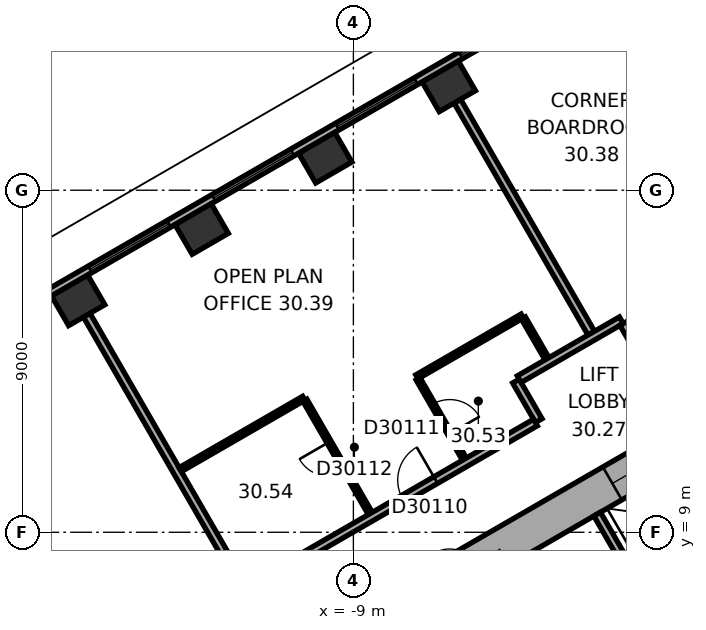
"""IFC4 building model, lengths in metres.
Left out: names, types, materials, properties, quantities, classifications, styles, units other than length and angle.
Written with IfcOpenShell. Run it as: python <this file> out.ifc"""

import sys

from ifc_helpers import new_model, si_unit, direction, frame, frame_2d, origin, origin_2d, place, context, subcontext, project, spatial, rectangle, extrude, element, fill, save


model = new_model("IFC4")
c1 = context("Model", 3, precision=1e-05, world=origin(), true_north=direction((0.0, 1.0)))
c2 = subcontext(c1, "Body", "Model", "MODEL_VIEW")
j1 = project(units=[si_unit("LENGTHUNIT", "METRE"), si_unit("PLANEANGLEUNIT", "RADIAN")], contexts=[c1])
p1 = place(None, origin())
s1 = spatial("IfcSite", under=j1, at=p1, CompositionType="ELEMENT")
p2 = place(p1, origin())
s2 = spatial("IfcBuilding", under=s1, at=p2, CompositionType="ELEMENT")
p3 = place(p2, frame((0.0, 0.0, 124.4)))
s3 = spatial("IfcBuildingStorey", under=s2, at=p3, CompositionType="ELEMENT", Elevation=124.4)
for number, where, z_axis, x_axis in (
    (1, (-6.489, 20.733, 0.0), (0.0, 0.0, 1.0), (-0.866, -0.5, 0.0)),
    (2, (-9.74, 18.856, 0.0), (0.0, 0.0, 1.0), (-0.866, -0.5, 0.0)),
    (3, (-12.991, 16.979, 0.0), (0.0, 0.0, 1.0), (-0.866, -0.5, 0.0)),
    (4, (-16.242, 15.102, 0.0), (0.0, 0.0, 1.0), (-0.866, -0.5, 0.0)),
):
    element("IfcColumn", number, at=place(p3, frame(where, z_axis=z_axis, x_axis=x_axis)), inside=s3, PredefinedType="COLUMN", context=c2, shape_type="SweptSolid", body=[
        extrude(rectangle(XDim=1.1, YDim=0.9, at=origin_2d()), origin(), (0.0, 0.0, 1.0), 3.7),
    ])
p4 = place(p3, frame((0.25, 11.691, 0.0), z_axis=(0.0, 0.0, 1.0), x_axis=(-0.866022616891, -0.50000482701, 0.0)))
e5 = element("IfcWall", 5, at=p4, inside=s3, PredefinedType="SHEAR", context=c2, shape_type="SweptSolid", body=[
    extrude(rectangle(XDim=12.125, YDim=1.0, at=frame_2d((6.062, 0.0))), origin(), (0.0, 0.0, 1.0), 3.7),
])
p5 = place(p4, frame((6.262, 0.0, 0.0)))
e6 = element("IfcOpeningElement", 6, at=p5, cuts=e5, PredefinedType="OPENING", context=c2, shape_type="SweptSolid", body=[
    extrude(rectangle(XDim=1.5, YDim=2.1, at=frame_2d((0.75, 1.05))), frame((0.0, 0.51, 0.0), z_axis=(0.0, -1.0, 0.0), x_axis=(1.0, 0.0, 0.0)), (0.0, 0.0, 1.0), 1.02),
])
p6 = place(p4, frame((1.712, 0.0, 0.0)))
e7 = element("IfcOpeningElement", 7, at=p6, cuts=e5, PredefinedType="OPENING", context=c2, shape_type="SweptSolid", body=[
    extrude(rectangle(XDim=1.1, YDim=2.1, at=frame_2d((0.55, 1.05))), frame((0.0, 0.51, 0.0), z_axis=(0.0, -1.0, 0.0), x_axis=(1.0, 0.0, 0.0)), (0.0, 0.0, 1.0), 1.02),
])
p7 = place(p3, frame((-2.961, 23.405, 0.0), z_axis=(0.0, 0.0, 1.0), x_axis=(-0.866023315909, -0.500003616288, 0.0)))
e8 = element("IfcWall", 8, at=p7, inside=s3, PredefinedType="STANDARD", context=c2, shape_type="SweptSolid", body=[
    extrude(rectangle(XDim=20.044, YDim=0.2, at=frame_2d((10.022, 0.0))), origin(), (0.0, 0.0, 1.0), 3.7),
])
p8 = place(p7, frame((1.314, 0.0, 0.9)))
e9 = element("IfcOpeningElement", 9, at=p8, cuts=e8, PredefinedType="OPENING", context=c2, shape_type="SweptSolid", body=[
    extrude(rectangle(XDim=2.4, YDim=2.0, at=frame_2d((1.2, 1.0))), frame((0.0, 0.11, 0.0), z_axis=(0.0, -1.0, 0.0), x_axis=(1.0, 0.0, 0.0)), (0.0, 0.0, 1.0), 0.22),
])
p9 = place(p7, frame((5.069, 0.0, 0.9)))
e10 = element("IfcOpeningElement", 10, at=p9, cuts=e8, PredefinedType="OPENING", context=c2, shape_type="SweptSolid", body=[
    extrude(rectangle(XDim=2.4, YDim=2.0, at=frame_2d((1.2, 1.0))), frame((0.0, 0.11, 0.0), z_axis=(0.0, -1.0, 0.0), x_axis=(1.0, 0.0, 0.0)), (0.0, 0.0, 1.0), 0.22),
])
p10 = place(p7, frame((8.823, 0.0, 0.9)))
e11 = element("IfcOpeningElement", 11, at=p10, cuts=e8, PredefinedType="OPENING", context=c2, shape_type="SweptSolid", body=[
    extrude(rectangle(XDim=2.4, YDim=2.0, at=frame_2d((1.2, 1.0))), frame((0.0, 0.11, 0.0), z_axis=(0.0, -1.0, 0.0), x_axis=(1.0, 0.0, 0.0)), (0.0, 0.0, 1.0), 0.22),
])
p11 = place(p7, frame((12.577, 0.0, 0.9)))
e12 = element("IfcOpeningElement", 12, at=p11, cuts=e8, PredefinedType="OPENING", context=c2, shape_type="SweptSolid", body=[
    extrude(rectangle(XDim=2.4, YDim=2.0, at=frame_2d((1.2, 1.0))), frame((0.0, 0.11, 0.0), z_axis=(0.0, -1.0, 0.0), x_axis=(1.0, 0.0, 0.0)), (0.0, 0.0, 1.0), 0.22),
])
p12 = place(p7, frame((16.331, 0.0, 0.9)))
e13 = element("IfcOpeningElement", 13, at=p12, cuts=e8, PredefinedType="OPENING", context=c2, shape_type="SweptSolid", body=[
    extrude(rectangle(XDim=2.4, YDim=2.0, at=frame_2d((1.2, 1.0))), frame((0.0, 0.11, 0.0), z_axis=(0.0, -1.0, 0.0), x_axis=(1.0, 0.0, 0.0)), (0.0, 0.0, 1.0), 0.22),
])
p13 = place(p3, frame((0.803, 9.009, 0.0), z_axis=(0.0, 0.0, 1.0), x_axis=(-0.866028230842, -0.499995103361, 0.0)))
e14 = element("IfcWall", 14, at=p13, inside=s3, PredefinedType="PARTITIONING", context=c2, shape_type="SweptSolid", body=[
    extrude(rectangle(XDim=5.4, YDim=0.2, at=frame_2d((2.7, 0.0))), origin(), (0.0, 0.0, 1.0), 3.42),
])
p14 = place(p3, frame((-1.485, 7.572, 0.0), z_axis=(0.0, 0.0, 1.0), x_axis=(-0.50002983664, 0.866008176907, 0.0)))
e15 = element("IfcWall", 15, at=p14, inside=s3, PredefinedType="PARTITIONING", context=c2, shape_type="SweptSolid", body=[
    extrude(rectangle(XDim=2.2, YDim=0.2, at=frame_2d((1.1, 0.0))), origin(), (0.0, 0.0, 1.0), 3.42),
])
p15 = place(p3, frame((-16.018, 14.712, 0.0), z_axis=(0.0, 0.0, 1.0), x_axis=(0.500000843414, -0.866024916838, 0.0)))
e16 = element("IfcWall", 16, at=p15, inside=s3, PredefinedType="PARTITIONING", context=c2, shape_type="SweptSolid", body=[
    extrude(rectangle(XDim=8.452, YDim=0.2, at=frame_2d((4.226, 0.0))), origin(), (0.0, 0.0, 1.0), 3.42),
])
p16 = place(p3, frame((-13.556, 10.649, 0.0), z_axis=(0.0, 0.0, 1.0), x_axis=(0.866020939036, 0.500007733091, 0.0)))
e17 = element("IfcWall", 17, at=p16, inside=s3, PredefinedType="PARTITIONING", context=c2, shape_type="SweptSolid", body=[
    extrude(rectangle(XDim=3.753, YDim=0.12, at=frame_2d((1.877, 0.0))), origin(), (0.0, 0.0, 1.0), 3.42),
])
p17 = place(p3, frame((-10.275, 12.473, 0.0), z_axis=(0.0, 0.0, 1.0), x_axis=(0.500009156386, -0.866020117278, 0.0)))
e18 = element("IfcWall", 18, at=p17, inside=s3, PredefinedType="PARTITIONING", context=c2, shape_type="SweptSolid", body=[
    extrude(rectangle(XDim=3.44, YDim=0.12, at=frame_2d((1.72, 0.0))), origin(), (0.0, 0.0, 1.0), 3.42),
])
p18 = place(p17, frame((1.27, 0.0, 0.0)))
e19 = element("IfcOpeningElement", 19, at=p18, cuts=e18, PredefinedType="OPENING", context=c2, shape_type="SweptSolid", body=[
    extrude(rectangle(XDim=0.9, YDim=2.1, at=frame_2d((0.45, 1.05))), frame((0.0, 0.07, 0.0), z_axis=(0.0, -1.0, 0.0), x_axis=(1.0, 0.0, 0.0)), (0.0, 0.0, 1.0), 0.14),
])
p19 = place(p3, frame((-7.328, 13.09, 0.0), z_axis=(0.0, 0.0, 1.0), x_axis=(0.866008981251, 0.500028443584, 0.0)))
e20 = element("IfcWall", 20, at=p19, inside=s3, PredefinedType="PARTITIONING", context=c2, shape_type="SweptSolid", body=[
    extrude(rectangle(XDim=3.2, YDim=0.12, at=frame_2d((1.6, 0.0))), origin(), (0.0, 0.0, 1.0), 3.42),
])
p20 = place(p3, frame((-6.264, 20.344, 0.0), z_axis=(0.0, 0.0, 1.0), x_axis=(0.500009260695, -0.866020057054, 0.0)))
e21 = element("IfcWall", 21, at=p20, inside=s3, PredefinedType="PARTITIONING", context=c2, shape_type="SweptSolid", body=[
    extrude(rectangle(XDim=7.049, YDim=0.2, at=frame_2d((3.524, 0.0))), origin(), (0.0, 0.0, 1.0), 3.42),
])
p21 = place(p3, frame((-6.078, 10.925, 0.0), z_axis=(0.0, 0.0, 1.0), x_axis=(-0.500002508028, 0.866023955769, 0.0)))
e22 = element("IfcWall", 22, at=p21, inside=s3, PredefinedType="PARTITIONING", context=c2, shape_type="SweptSolid", body=[
    extrude(rectangle(XDim=2.44, YDim=0.12, at=frame_2d((1.22, 0.0))), origin(), (0.0, 0.0, 1.0), 2.87),
])
p22 = place(p21, frame((0.77, 0.0, 0.0)))
e23 = element("IfcOpeningElement", 23, at=p22, cuts=e22, PredefinedType="OPENING", context=c2, shape_type="SweptSolid", body=[
    extrude(rectangle(XDim=0.9, YDim=2.1, at=frame_2d((0.45, 1.05))), frame((0.0, 0.07, 0.0), z_axis=(0.0, -1.0, 0.0), x_axis=(1.0, 0.0, 0.0)), (0.0, 0.0, 1.0), 0.14),
])
p23 = place(p3, frame((-4.723, 12.978, 0.0), z_axis=(0.0, 0.0, 1.0), x_axis=(0.500074377092, -0.865982457891, 0.0)))
e24 = element("IfcWall", 24, at=p23, inside=s3, PredefinedType="PARTITIONING", context=c2, shape_type="SweptSolid", body=[
    extrude(rectangle(XDim=1.201, YDim=0.2, at=frame_2d((0.601, 0.0))), origin(), (0.0, 0.0, 1.0), 3.42),
])
p24 = place(p3, frame((-4.526, 14.638, 0.0), z_axis=(0.0, 0.0, 1.0), x_axis=(0.499932836684, -0.86606417707, 0.0)))
e25 = element("IfcWall", 25, at=p24, inside=s3, PredefinedType="PARTITIONING", context=c2, shape_type="SweptSolid", body=[
    extrude(rectangle(XDim=1.239, YDim=0.12, at=frame_2d((0.62, 0.0))), origin(), (0.0, 0.0, 1.0), 3.42),
])
p25 = place(p3, frame((-4.209, 11.888, 0.0), z_axis=(0.0, 0.0, 1.0), x_axis=(-0.866020930448, -0.500007747966, 0.0)))
e26 = element("IfcWall", 26, at=p25, inside=s3, PredefinedType="PARTITIONING", context=c2, shape_type="SweptSolid", body=[
    extrude(rectangle(XDim=8.321, YDim=0.2, at=frame_2d((4.161, 0.0))), origin(), (0.0, 0.0, 1.0), 3.42),
])
p26 = place(p25, frame((3.031, 0.0, 0.0)))
e27 = element("IfcOpeningElement", 27, at=p26, cuts=e26, PredefinedType="OPENING", context=c2, shape_type="SweptSolid", body=[
    extrude(rectangle(XDim=1.0, YDim=2.1, at=frame_2d((0.5, 1.05))), frame((0.0, 0.11, 0.0), z_axis=(0.0, -1.0, 0.0), x_axis=(1.0, 0.0, 0.0)), (0.0, 0.0, 1.0), 0.22),
])
p27 = place(p3, frame((-1.95, 14.579, 0.0), z_axis=(0.0, 0.0, 1.0), x_axis=(-0.866011260204, -0.500024496599, 0.0)))
e28 = element("IfcWall", 28, at=p27, inside=s3, PredefinedType="PARTITIONING", context=c2, shape_type="SweptSolid", body=[
    extrude(rectangle(XDim=3.102, YDim=0.2, at=frame_2d((1.551, 0.0))), origin(), (0.0, 0.0, 1.0), 3.42),
])
p28 = place(p3, frame((-1.349, 13.539, 0.0), z_axis=(0.0, 0.0, 1.0), x_axis=(-0.500074377092, 0.865982457891, 0.0)))
e29 = element("IfcWall", 29, at=p28, inside=s3, PredefinedType="PARTITIONING", context=c2, shape_type="SweptSolid", body=[
    extrude(rectangle(XDim=1.101, YDim=0.2, at=frame_2d((0.55, 0.0))), origin(), (0.0, 0.0, 1.0), 3.42),
])
p29 = place(p8, origin())
e30 = element("IfcWindow", 30, at=p29, inside=s3, PartitioningType="SINGLE_PANEL", PredefinedType="WINDOW", context=c2, shape_type="SweptSolid", body=[
    extrude(rectangle(XDim=2.4, YDim=2.0, at=frame_2d((1.2, 1.0))), frame((0.0, 0.03, 0.0), z_axis=(0.0, -1.0, 0.0), x_axis=(1.0, 0.0, 0.0)), (0.0, 0.0, 1.0), 0.06),
])
fill(e9, e30)
p30 = place(p9, origin())
e31 = element("IfcWindow", 31, at=p30, inside=s3, PartitioningType="SINGLE_PANEL", PredefinedType="WINDOW", context=c2, shape_type="SweptSolid", body=[
    extrude(rectangle(XDim=2.4, YDim=2.0, at=frame_2d((1.2, 1.0))), frame((0.0, 0.03, 0.0), z_axis=(0.0, -1.0, 0.0), x_axis=(1.0, 0.0, 0.0)), (0.0, 0.0, 1.0), 0.06),
])
fill(e10, e31)
p31 = place(p10, origin())
e32 = element("IfcWindow", 32, at=p31, inside=s3, PartitioningType="SINGLE_PANEL", PredefinedType="WINDOW", context=c2, shape_type="SweptSolid", body=[
    extrude(rectangle(XDim=2.4, YDim=2.0, at=frame_2d((1.2, 1.0))), frame((0.0, 0.03, 0.0), z_axis=(0.0, -1.0, 0.0), x_axis=(1.0, 0.0, 0.0)), (0.0, 0.0, 1.0), 0.06),
])
fill(e11, e32)
p32 = place(p11, origin())
e33 = element("IfcWindow", 33, at=p32, inside=s3, PartitioningType="SINGLE_PANEL", PredefinedType="WINDOW", context=c2, shape_type="SweptSolid", body=[
    extrude(rectangle(XDim=2.4, YDim=2.0, at=frame_2d((1.2, 1.0))), frame((0.0, 0.03, 0.0), z_axis=(0.0, -1.0, 0.0), x_axis=(1.0, 0.0, 0.0)), (0.0, 0.0, 1.0), 0.06),
])
fill(e12, e33)
p33 = place(p5, origin())
e34 = element("IfcDoor", 34, at=p33, inside=s3, OperationType="DOUBLE_DOOR_SINGLE_SWING", PredefinedType="DOOR", context=c2, shape_type="SweptSolid", body=[
    extrude(rectangle(XDim=1.5, YDim=2.1, at=frame_2d((0.75, 1.05))), frame((0.0, 0.025, 0.0), z_axis=(0.0, -1.0, 0.0), x_axis=(1.0, 0.0, 0.0)), (0.0, 0.0, 1.0), 0.05),
])
fill(e6, e34)
p34 = place(p6, origin())
e35 = element("IfcDoor", 35, at=p34, inside=s3, OperationType="DOUBLE_DOOR_SLIDING", PredefinedType="DOOR", context=c2, shape_type="SweptSolid", body=[
    extrude(rectangle(XDim=1.1, YDim=2.1, at=frame_2d((0.55, 1.05))), frame((0.0, 0.025, 0.0), z_axis=(0.0, -1.0, 0.0), x_axis=(1.0, 0.0, 0.0)), (0.0, 0.0, 1.0), 0.05),
])
fill(e7, e35)
p35 = place(p26, origin())
e36 = element("IfcDoor", 36, at=p35, inside=s3, OperationType="SINGLE_SWING_LEFT", PredefinedType="DOOR", context=c2, shape_type="SweptSolid", body=[
    extrude(rectangle(XDim=1.0, YDim=2.1, at=frame_2d((0.5, 1.05))), frame((0.0, 0.025, 0.0), z_axis=(0.0, -1.0, 0.0), x_axis=(1.0, 0.0, 0.0)), (0.0, 0.0, 1.0), 0.05),
])
fill(e27, e36)
p36 = place(p22, origin())
e37 = element("IfcDoor", 37, at=p36, inside=s3, OperationType="SINGLE_SWING_LEFT", PredefinedType="DOOR", context=c2, shape_type="SweptSolid", body=[
    extrude(rectangle(XDim=0.9, YDim=2.1, at=frame_2d((0.45, 1.05))), frame((0.0, 0.025, 0.0), z_axis=(0.0, -1.0, 0.0), x_axis=(1.0, 0.0, 0.0)), (0.0, 0.0, 1.0), 0.05),
])
fill(e23, e37)
p37 = place(p18, origin())
e38 = element("IfcDoor", 38, at=p37, inside=s3, OperationType="SINGLE_SWING_LEFT", PredefinedType="DOOR", context=c2, shape_type="SweptSolid", body=[
    extrude(rectangle(XDim=0.9, YDim=2.1, at=frame_2d((0.45, 1.05))), frame((0.0, 0.025, 0.0), z_axis=(0.0, -1.0, 0.0), x_axis=(1.0, 0.0, 0.0)), (0.0, 0.0, 1.0), 0.05),
])
fill(e19, e38)
save(model, sys.argv[1])
